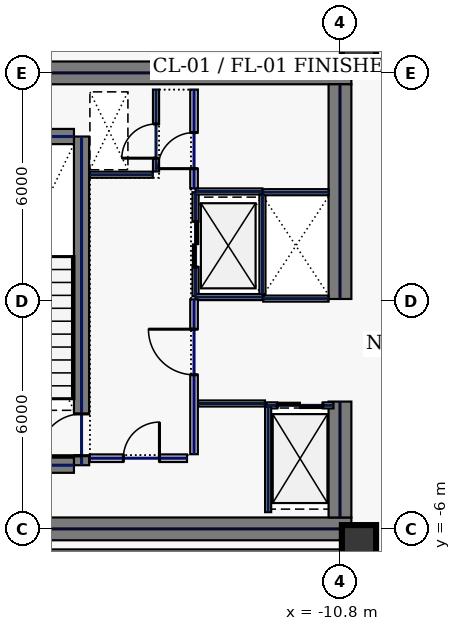
"""IFC4 building model, lengths in metres.
Left out: names, types, materials, properties, quantities, classifications, styles, units other than length and angle.
Written with IfcOpenShell. Run it as: python <this file> out.ifc"""

import sys

from ifc_helpers import new_model, si_unit, direction, frame, frame_2d, origin, origin_2d, place, context, subcontext, project, spatial, rectangle, hollow_rectangle, extrude, element, fill, save


model = new_model("IFC4")
c1 = context("Model", 3, precision=1e-05, world=origin(), true_north=direction((0.0, 1.0)))
c2 = subcontext(c1, "Body", "Model", "MODEL_VIEW")
j1 = project(units=[si_unit("LENGTHUNIT", "METRE"), si_unit("PLANEANGLEUNIT", "RADIAN")], contexts=[c1])
p1 = place(None, origin())
s1 = spatial("IfcSite", under=j1, at=p1, CompositionType="ELEMENT")
p2 = place(p1, origin())
s2 = spatial("IfcBuilding", under=s1, at=p2, CompositionType="ELEMENT")
p3 = place(p2, frame((0.0, 0.0, 218.2)))
s3 = spatial("IfcBuildingStorey", under=s2, at=p3, CompositionType="ELEMENT", Elevation=218.2)
for number, where, z_axis, x_axis in (
    (1, (-22.0, 6.0, 0.0), (0.0, 0.0, 1.0), (1.0, 0.0, 0.0)),
    (2, (-22.0, -6.0, 0.0), (0.0, 0.0, 1.0), (1.0, 0.0, 0.0)),
):
    element("IfcWall", number, at=place(p3, frame(where, z_axis=z_axis, x_axis=x_axis)), inside=s3, PredefinedType="SHEAR", context=c2, shape_type="SweptSolid", body=[
        extrude(rectangle(XDim=11.5, YDim=0.6, at=frame_2d((5.75, 0.0))), origin(), (0.0, 0.0, 1.0), 3.74),
    ])
p4 = place(p3, frame((-10.8, -5.7, 0.0), z_axis=(0.0, 0.0, 1.0), x_axis=(0.0, 1.0, 0.0)))
e3 = element("IfcWall", 3, at=p4, inside=s3, PredefinedType="SHEAR", context=c2, shape_type="SweptSolid", body=[
    extrude(rectangle(XDim=3.05, YDim=0.6, at=frame_2d((1.525, 0.0))), origin(), (0.0, 0.0, 1.0), 3.74),
])
p5 = place(p3, frame((-10.8, 0.05, 0.0), z_axis=(0.0, 0.0, 1.0), x_axis=(0.0, 1.0, 0.0)))
e4 = element("IfcWall", 4, at=p5, inside=s3, PredefinedType="SHEAR", context=c2, shape_type="SweptSolid", body=[
    extrude(rectangle(XDim=5.65, YDim=0.6, at=frame_2d((2.825, 0.0))), origin(), (0.0, 0.0, 1.0), 3.74),
])
p6 = place(p3, frame((-17.6, -4.325, 0.0), z_axis=(0.0, 0.0, 1.0), x_axis=(0.0, 1.0, 0.0)))
e5 = element("IfcWall", 5, at=p6, inside=s3, PredefinedType="SHEAR", context=c2, shape_type="SweptSolid", body=[
    extrude(rectangle(XDim=8.65, YDim=0.4, at=frame_2d((4.325, 0.0))), origin(), (0.0, 0.0, 1.0), 3.74),
])
p7 = place(p6, frame((0.25, 0.0, 0.0)))
e6 = element("IfcOpeningElement", 6, at=p7, cuts=e5, PredefinedType="OPENING", context=c2, shape_type="SweptSolid", body=[
    extrude(rectangle(XDim=1.1, YDim=2.2, at=frame_2d((0.55, 1.1))), frame((0.0, 0.21, 0.0), z_axis=(0.0, -1.0, 0.0), x_axis=(1.0, 0.0, 0.0)), (0.0, 0.0, 1.0), 0.42),
])
for number, where, z_axis, x_axis in (
    (7, (-21.2, -4.325, 0.0), (0.0, 0.0, 1.0), (1.0, 0.0, 0.0)),
    (8, (-21.2, 4.325, 0.0), (0.0, 0.0, 1.0), (1.0, 0.0, 0.0)),
):
    element("IfcWall", number, at=place(p3, frame(where, z_axis=z_axis, x_axis=x_axis)), inside=s3, PredefinedType="SHEAR", context=c2, shape_type="SweptSolid", body=[
        extrude(rectangle(XDim=3.4, YDim=0.4, at=frame_2d((1.7, 0.0))), origin(), (0.0, 0.0, 1.0), 3.74),
    ])
for number, where, z_axis, x_axis in (
    (9, (-10.3, -6.35, 0.0), (0.0, 0.0, 1.0), (1.0, 0.0, 0.0)),
    (10, (-10.3, 6.35, 0.0), (0.0, 0.0, 1.0), (1.0, 0.0, 0.0)),
):
    element("IfcColumn", number, at=place(p3, frame(where, z_axis=z_axis, x_axis=x_axis)), inside=s3, PredefinedType="COLUMN", context=c2, shape_type="SweptSolid", body=[
        extrude(hollow_rectangle(XDim=0.9, YDim=0.9, WallThickness=0.04, at=origin_2d()), origin(), (0.0, 0.0, 1.0), 3.74),
    ])
p8 = place(p3, frame((-14.6, 0.12, 0.0), z_axis=(0.0, 0.0, 1.0), x_axis=(0.0, 1.0, 0.0)))
e11 = element("IfcWall", 11, at=p8, inside=s3, PredefinedType="PARTITIONING", context=c2, shape_type="SweptSolid", body=[
    extrude(rectangle(XDim=2.74, YDim=0.16, at=frame_2d((1.37, 0.0))), origin(), (0.0, 0.0, 1.0), 3.74),
])
p9 = place(p8, frame((0.77, 0.0, 0.0)))
e12 = element("IfcOpeningElement", 12, at=p9, cuts=e11, PredefinedType="OPENING", context=c2, shape_type="SweptSolid", body=[
    extrude(rectangle(XDim=1.2, YDim=2.2, at=frame_2d((0.6, 1.1))), frame((0.0, 0.09, 0.0), z_axis=(0.0, -1.0, 0.0), x_axis=(1.0, 0.0, 0.0)), (0.0, 0.0, 1.0), 0.18),
])
for number, where, z_axis, x_axis in (
    (13, (-14.6, 0.1, 0.0), (0.0, 0.0, 1.0), (1.0, 0.0, 0.0)),
    (14, (-14.6, 2.88, 0.0), (0.0, 0.0, 1.0), (1.0, 0.0, 0.0)),
):
    element("IfcWall", number, at=place(p3, frame(where, z_axis=z_axis, x_axis=x_axis)), inside=s3, PredefinedType="PARTITIONING", context=c2, shape_type="SweptSolid", body=[
        extrude(rectangle(XDim=1.76, YDim=0.16, at=frame_2d((0.88, 0.0))), origin(), (0.0, 0.0, 1.0), 3.74),
    ])
p10 = place(p3, frame((-12.84, 0.18, 0.0), z_axis=(0.0, 0.0, 1.0), x_axis=(0.0, 1.0, 0.0)))
e15 = element("IfcWall", 15, at=p10, inside=s3, PredefinedType="PARTITIONING", context=c2, shape_type="SweptSolid", body=[
    extrude(rectangle(XDim=2.62, YDim=0.16, at=frame_2d((1.31, 0.0))), origin(), (0.0, 0.0, 1.0), 3.74),
])
p11 = place(p3, frame((-12.73, -2.75, 0.0), z_axis=(0.0, 0.0, 1.0), x_axis=(1.0, 0.0, 0.0)))
e16 = element("IfcWall", 16, at=p11, inside=s3, PredefinedType="PARTITIONING", context=c2, shape_type="SweptSolid", body=[
    extrude(rectangle(XDim=1.76, YDim=0.16, at=frame_2d((0.88, 0.0))), origin(), (0.0, 0.0, 1.0), 3.74),
])
p12 = place(p11, frame((0.28, 0.0, 0.0)))
e17 = element("IfcOpeningElement", 17, at=p12, cuts=e16, PredefinedType="OPENING", context=c2, shape_type="SweptSolid", body=[
    extrude(rectangle(XDim=1.2, YDim=2.2, at=frame_2d((0.6, 1.1))), frame((0.0, 0.09, 0.0), z_axis=(0.0, -1.0, 0.0), x_axis=(1.0, 0.0, 0.0)), (0.0, 0.0, 1.0), 0.18),
])
for number, where, z_axis, x_axis in (
    (18, (-12.82, 0.06, 0.0), (0.0, 0.0, 1.0), (1.0, 0.0, 0.0)),
    (19, (-12.82, 2.86, 0.0), (0.0, 0.0, 1.0), (1.0, 0.0, 0.0)),
):
    element("IfcWall", number, at=place(p3, frame(where, z_axis=z_axis, x_axis=x_axis)), inside=s3, PredefinedType="PARTITIONING", context=c2, shape_type="SweptSolid", body=[
        extrude(rectangle(XDim=1.72, YDim=0.16, at=frame_2d((0.86, 0.0))), origin(), (0.0, 0.0, 1.0), 3.74),
    ])
p13 = place(p3, frame((-15.64, 3.405, 0.0), z_axis=(0.0, 0.0, 1.0), x_axis=(0.0, 1.0, 0.0)))
e20 = element("IfcWall", 20, at=p13, inside=s3, PredefinedType="PARTITIONING", context=c2, shape_type="SweptSolid", body=[
    extrude(rectangle(XDim=2.155, YDim=0.16, at=frame_2d((1.078, 0.0))), origin(), (0.0, 0.0, 1.0), 3.74),
])
p14 = place(p13, frame((0.35, 0.0, 0.0)))
e21 = element("IfcOpeningElement", 21, at=p14, cuts=e20, PredefinedType="OPENING", context=c2, shape_type="SweptSolid", body=[
    extrude(rectangle(XDim=0.9, YDim=2.2, at=frame_2d((0.45, 1.1))), frame((0.0, 0.09, 0.0), z_axis=(0.0, -1.0, 0.0), x_axis=(1.0, 0.0, 0.0)), (0.0, 0.0, 1.0), 0.18),
])
p15 = place(p3, frame((-17.38, 3.32, 0.0), z_axis=(0.0, 0.0, 1.0), x_axis=(1.0, 0.0, 0.0)))
e22 = element("IfcWall", 22, at=p15, inside=s3, PredefinedType="PARTITIONING", context=c2, shape_type="SweptSolid", body=[
    extrude(rectangle(XDim=1.655, YDim=0.16, at=frame_2d((0.827, 0.0))), origin(), (0.0, 0.0, 1.0), 3.74),
])
p16 = place(p3, frame((-17.38, -4.14, 0.0), z_axis=(0.0, 0.0, 1.0), x_axis=(1.0, 0.0, 0.0)))
e23 = element("IfcWall", 23, at=p16, inside=s3, PredefinedType="SOLIDWALL", context=c2, shape_type="SweptSolid", body=[
    extrude(rectangle(XDim=2.555, YDim=0.2, at=frame_2d((1.277, 0.0))), origin(), (0.0, 0.0, 1.0), 3.74),
])
p17 = place(p16, frame((0.88, 0.0, 0.0)))
e24 = element("IfcOpeningElement", 24, at=p17, cuts=e23, PredefinedType="OPENING", context=c2, shape_type="SweptSolid", body=[
    extrude(rectangle(XDim=0.95, YDim=2.2, at=frame_2d((0.475, 1.1))), frame((0.0, 0.11, 0.0), z_axis=(0.0, -1.0, 0.0), x_axis=(1.0, 0.0, 0.0)), (0.0, 0.0, 1.0), 0.22),
])
p18 = place(p3, frame((-14.535, -2.7, 0.0), z_axis=(0.0, 0.0, 1.0), x_axis=(1.0, 0.0, 0.0)))
e25 = element("IfcWall", 25, at=p18, inside=s3, PredefinedType="PARTITIONING", context=c2, shape_type="SweptSolid", body=[
    extrude(rectangle(XDim=1.76, YDim=0.16, at=frame_2d((0.88, 0.0))), origin(), (0.0, 0.0, 1.0), 3.74),
])
p19 = place(p3, frame((-12.69, -5.56, 0.0), z_axis=(0.0, 0.0, 1.0), x_axis=(0.0, 1.0, 0.0)))
e26 = element("IfcWall", 26, at=p19, inside=s3, PredefinedType="PARTITIONING", context=c2, shape_type="SweptSolid", body=[
    extrude(rectangle(XDim=2.775, YDim=0.16, at=frame_2d((1.388, 0.0))), origin(), (0.0, 0.0, 1.0), 3.74),
])
p20 = place(p3, frame((-14.64, 2.96, 0.0), z_axis=(0.0, 0.0, 1.0), x_axis=(0.0, 1.0, 0.0)))
e27 = element("IfcWall", 27, at=p20, inside=s3, PredefinedType="SOLIDWALL", context=c2, shape_type="SweptSolid", body=[
    extrude(rectangle(XDim=2.6, YDim=0.2, at=frame_2d((1.3, 0.0))), origin(), (0.0, 0.0, 1.0), 3.74),
])
p21 = place(p20, frame((0.52, 0.0, 0.0)))
e28 = element("IfcOpeningElement", 28, at=p21, cuts=e27, PredefinedType="OPENING", context=c2, shape_type="SweptSolid", body=[
    extrude(rectangle(XDim=0.95, YDim=2.2, at=frame_2d((0.475, 1.1))), frame((0.0, 0.11, 0.0), z_axis=(0.0, -1.0, 0.0), x_axis=(1.0, 0.0, 0.0)), (0.0, 0.0, 1.0), 0.22),
])
p22 = place(p3, frame((-14.64, -4.035, 0.0), z_axis=(0.0, 0.0, 1.0), x_axis=(0.0, 1.0, 0.0)))
e29 = element("IfcWall", 29, at=p22, inside=s3, PredefinedType="SOLIDWALL", context=c2, shape_type="SweptSolid", body=[
    extrude(rectangle(XDim=4.075, YDim=0.2, at=frame_2d((2.038, 0.0))), origin(), (0.0, 0.0, 1.0), 3.74),
])
p23 = place(p22, frame((2.09, 0.0, 0.0)))
e30 = element("IfcOpeningElement", 30, at=p23, cuts=e29, PredefinedType="OPENING", context=c2, shape_type="SweptSolid", body=[
    extrude(rectangle(XDim=1.2, YDim=2.2, at=frame_2d((0.6, 1.1))), frame((0.0, 0.11, 0.0), z_axis=(0.0, -1.0, 0.0), x_axis=(1.0, 0.0, 0.0)), (0.0, 0.0, 1.0), 0.22),
])
p24 = place(p3, frame((-24.815, -6.62, 0.0), z_axis=(0.0, 0.0, 1.0), x_axis=(1.0, 0.0, 0.0)))
e31 = element("IfcWall", 31, at=p24, inside=s3, PredefinedType="PARTITIONING", context=c2, shape_type="SweptSolid", body=[
    extrude(rectangle(XDim=14.185, YDim=0.16, at=frame_2d((7.093, 0.0))), origin(), (0.0, 0.0, 1.0), 3.74),
])
p25 = place(p7, origin())
e32 = element("IfcDoor", 32, at=p25, inside=s3, OperationType="SINGLE_SWING_LEFT", PredefinedType="DOOR", context=c2, shape_type="SweptSolid", body=[
    extrude(rectangle(XDim=1.1, YDim=2.2, at=frame_2d((0.55, 1.1))), frame((0.0, 0.025, 0.0), z_axis=(0.0, -1.0, 0.0), x_axis=(1.0, 0.0, 0.0)), (0.0, 0.0, 1.0), 0.05),
])
fill(e6, e32)
p26 = place(p9, origin())
e33 = element("IfcDoor", 33, at=p26, inside=s3, OperationType="SLIDING_TO_LEFT", PredefinedType="DOOR", context=c2, shape_type="SweptSolid", body=[
    extrude(rectangle(XDim=1.2, YDim=2.2, at=frame_2d((0.6, 1.1))), frame((0.0, 0.025, 0.0), z_axis=(0.0, -1.0, 0.0), x_axis=(1.0, 0.0, 0.0)), (0.0, 0.0, 1.0), 0.05),
])
fill(e12, e33)
p27 = place(p12, origin())
e34 = element("IfcDoor", 34, at=p27, inside=s3, OperationType="SLIDING_TO_LEFT", PredefinedType="DOOR", context=c2, shape_type="SweptSolid", body=[
    extrude(rectangle(XDim=1.2, YDim=2.2, at=frame_2d((0.6, 1.1))), frame((0.0, 0.025, 0.0), z_axis=(0.0, -1.0, 0.0), x_axis=(1.0, 0.0, 0.0)), (0.0, 0.0, 1.0), 0.05),
])
fill(e17, e34)
p28 = place(p14, origin())
e35 = element("IfcDoor", 35, at=p28, inside=s3, OperationType="SINGLE_SWING_LEFT", PredefinedType="DOOR", context=c2, shape_type="SweptSolid", body=[
    extrude(rectangle(XDim=0.9, YDim=2.2, at=frame_2d((0.45, 1.1))), frame((0.0, 0.025, 0.0), z_axis=(0.0, -1.0, 0.0), x_axis=(1.0, 0.0, 0.0)), (0.0, 0.0, 1.0), 0.05),
])
fill(e21, e35)
p29 = place(p17, origin())
e36 = element("IfcDoor", 36, at=p29, inside=s3, OperationType="SINGLE_SWING_RIGHT", PredefinedType="DOOR", context=c2, shape_type="SweptSolid", body=[
    extrude(rectangle(XDim=0.95, YDim=2.2, at=frame_2d((0.475, 1.1))), frame((0.0, 0.025, 0.0), z_axis=(0.0, -1.0, 0.0), x_axis=(1.0, 0.0, 0.0)), (0.0, 0.0, 1.0), 0.05),
])
fill(e24, e36)
p30 = place(p21, origin())
e37 = element("IfcDoor", 37, at=p30, inside=s3, OperationType="SINGLE_SWING_LEFT", PredefinedType="DOOR", context=c2, shape_type="SweptSolid", body=[
    extrude(rectangle(XDim=0.95, YDim=2.2, at=frame_2d((0.475, 1.1))), frame((0.0, 0.025, 0.0), z_axis=(0.0, -1.0, 0.0), x_axis=(1.0, 0.0, 0.0)), (0.0, 0.0, 1.0), 0.05),
])
fill(e28, e37)
p31 = place(p23, origin())
e38 = element("IfcDoor", 38, at=p31, inside=s3, OperationType="SINGLE_SWING_RIGHT", PredefinedType="DOOR", context=c2, shape_type="SweptSolid", body=[
    extrude(rectangle(XDim=1.2, YDim=2.2, at=frame_2d((0.6, 1.1))), frame((0.0, 0.025, 0.0), z_axis=(0.0, -1.0, 0.0), x_axis=(1.0, 0.0, 0.0)), (0.0, 0.0, 1.0), 0.05),
])
fill(e30, e38)
save(model, sys.argv[1])
